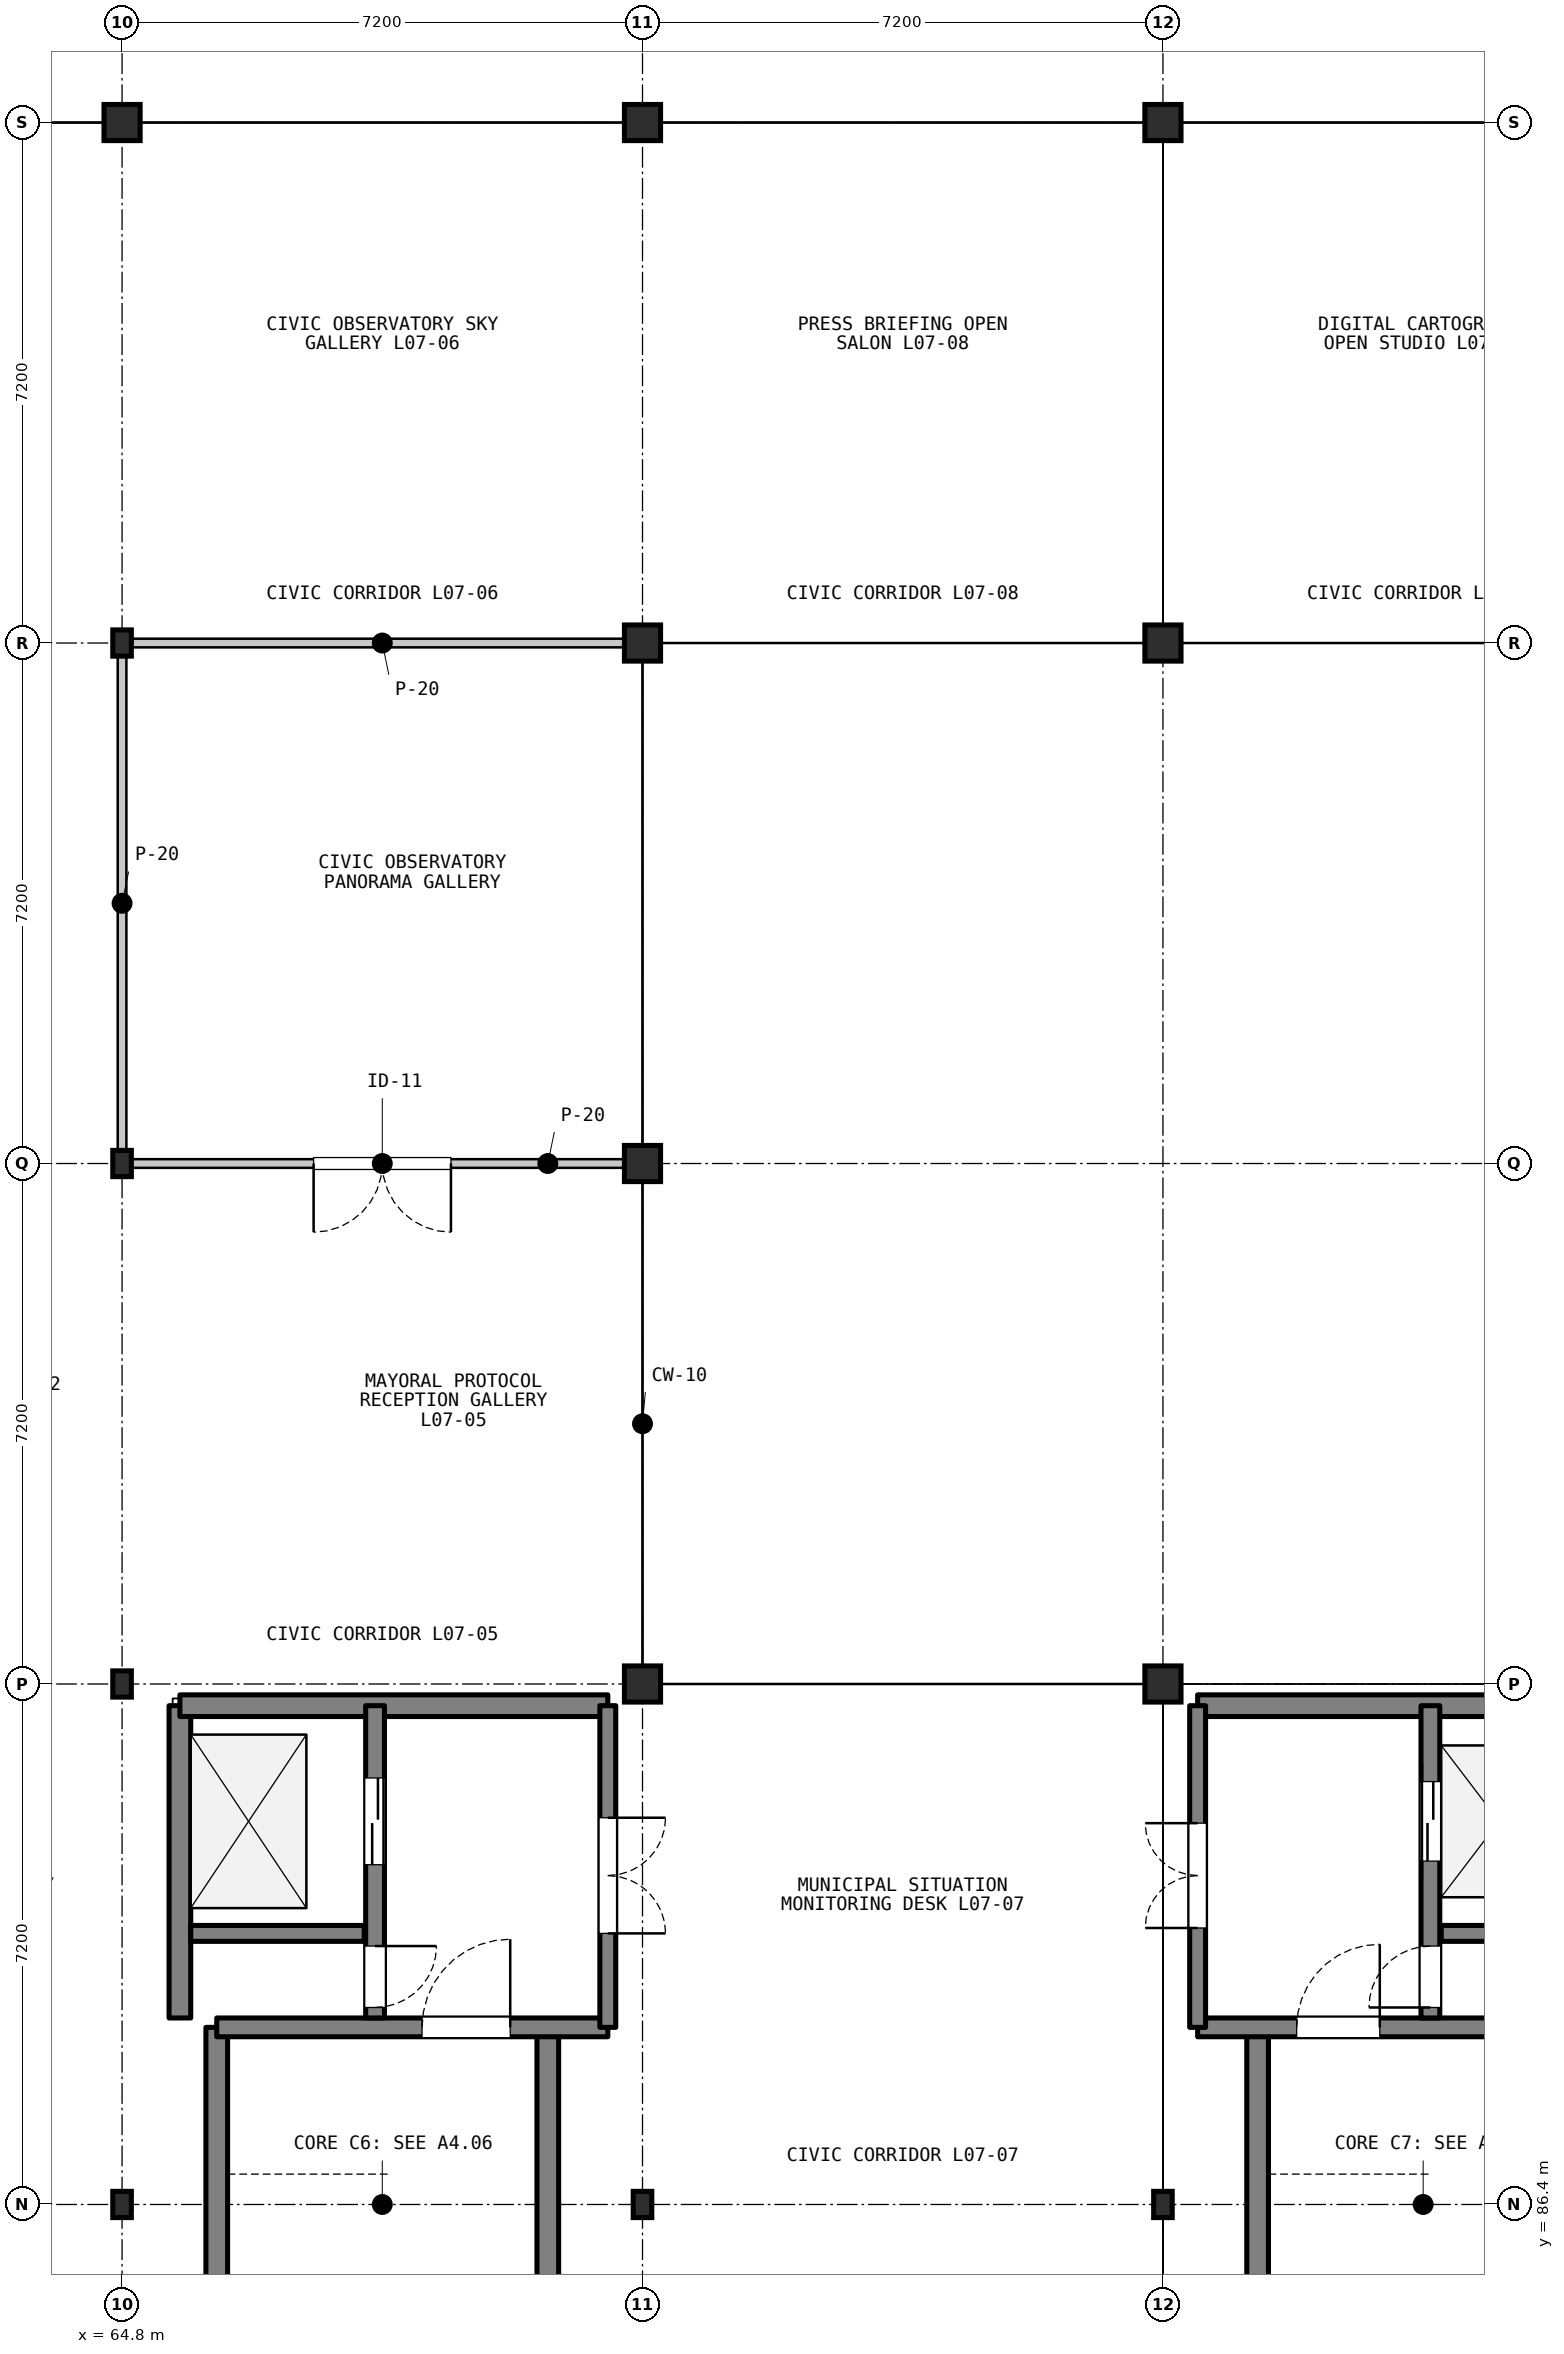
"""IFC4 building model, lengths in metres.
Left out: names, types, materials, properties, quantities, classifications, styles, units other than length and angle.
Written with IfcOpenShell. Run it as: python <this file> out.ifc"""

import sys

from ifc_helpers import new_model, si_unit, direction, frame, frame_2d, origin, origin_2d, place, context, subcontext, project, spatial, rectangle, i_section, extrude, element, fill, save


model = new_model("IFC4")
c1 = context("Model", 3, precision=1e-05, world=origin(), true_north=direction((0.0, 1.0)))
c2 = subcontext(c1, "Body", "Model", "MODEL_VIEW")
j1 = project(units=[si_unit("LENGTHUNIT", "METRE"), si_unit("PLANEANGLEUNIT", "RADIAN")], contexts=[c1])
p1 = place(None, origin())
s1 = spatial("IfcSite", under=j1, at=p1, CompositionType="ELEMENT")
p2 = place(p1, origin())
s2 = spatial("IfcBuilding", under=s1, at=p2, CompositionType="ELEMENT")
p3 = place(p2, frame((0.0, 0.0, 25.8)))
s3 = spatial("IfcBuildingStorey", under=s2, at=p3, CompositionType="ELEMENT", Elevation=25.8)
p4 = place(p3, frame((64.8, 86.4, 0.0), z_axis=(0.0, 0.0, 1.0), x_axis=(1.0, 0.0, 0.0)))
e1 = element("IfcColumn", 1, at=p4, inside=s3, PredefinedType="COLUMN", context=c2, shape_type="SweptSolid", body=[
    extrude(i_section(OverallWidth=0.257, OverallDepth=0.363, WebThickness=0.013, FlangeThickness=0.022, FilletRadius=0.015, at=origin_2d()), origin(), (0.0, 0.0, 1.0), 3.733),
])
for number, where, z_axis, x_axis in (
    (2, (64.8, 93.6, 0.0), (0.0, 0.0, 1.0), (1.0, 0.0, 0.0)),
    (3, (64.8, 100.8, 0.0), (0.0, 0.0, 1.0), (1.0, 0.0, 0.0)),
    (4, (64.8, 108.0, 0.0), (0.0, 0.0, 1.0), (1.0, 0.0, 0.0)),
):
    element("IfcColumn", number, at=place(p3, frame(where, z_axis=z_axis, x_axis=x_axis)), inside=s3, PredefinedType="COLUMN", context=c2, shape_type="SweptSolid", body=[
        extrude(i_section(OverallWidth=0.257, OverallDepth=0.363, WebThickness=0.013, FlangeThickness=0.022, FilletRadius=0.015, at=origin_2d()), origin(), (0.0, 0.0, 1.0), 4.2),
    ])
p5 = place(p3, frame((64.8, 115.2, 0.0), z_axis=(0.0, 0.0, 1.0), x_axis=(1.0, 0.0, 0.0)))
e5 = element("IfcColumn", 5, at=p5, inside=s3, PredefinedType="COLUMN", context=c2, shape_type="SweptSolid", body=[
    extrude(rectangle(XDim=0.5, YDim=0.5, at=origin_2d()), origin(), (0.0, 0.0, 1.0), 4.2),
])
p6 = place(p3, frame((72.0, 86.4, 0.0), z_axis=(0.0, 0.0, 1.0), x_axis=(1.0, 0.0, 0.0)))
e6 = element("IfcColumn", 6, at=p6, inside=s3, PredefinedType="COLUMN", context=c2, shape_type="SweptSolid", body=[
    extrude(i_section(OverallWidth=0.257, OverallDepth=0.363, WebThickness=0.013, FlangeThickness=0.022, FilletRadius=0.015, at=origin_2d()), origin(), (0.0, 0.0, 1.0), 3.733),
])
for number, where, z_axis, x_axis in (
    (7, (72.0, 93.6, 0.0), (0.0, 0.0, 1.0), (1.0, 0.0, 0.0)),
    (8, (72.0, 100.8, 0.0), (0.0, 0.0, 1.0), (1.0, 0.0, 0.0)),
    (9, (72.0, 108.0, 0.0), (0.0, 0.0, 1.0), (1.0, 0.0, 0.0)),
    (10, (72.0, 115.2, 0.0), (0.0, 0.0, 1.0), (1.0, 0.0, 0.0)),
):
    element("IfcColumn", number, at=place(p3, frame(where, z_axis=z_axis, x_axis=x_axis)), inside=s3, PredefinedType="COLUMN", context=c2, shape_type="SweptSolid", body=[
        extrude(rectangle(XDim=0.5, YDim=0.5, at=origin_2d()), origin(), (0.0, 0.0, 1.0), 4.2),
    ])
p7 = place(p3, frame((79.2, 86.4, 0.0), z_axis=(0.0, 0.0, 1.0), x_axis=(1.0, 0.0, 0.0)))
e11 = element("IfcColumn", 11, at=p7, inside=s3, PredefinedType="COLUMN", context=c2, shape_type="SweptSolid", body=[
    extrude(i_section(OverallWidth=0.257, OverallDepth=0.363, WebThickness=0.013, FlangeThickness=0.022, FilletRadius=0.015, at=origin_2d()), origin(), (0.0, 0.0, 1.0), 3.733),
])
for number, where, z_axis, x_axis in (
    (12, (79.2, 93.6, 0.0), (0.0, 0.0, 1.0), (1.0, 0.0, 0.0)),
    (13, (79.2, 108.0, 0.0), (0.0, 0.0, 1.0), (1.0, 0.0, 0.0)),
    (14, (79.2, 115.2, 0.0), (0.0, 0.0, 1.0), (1.0, 0.0, 0.0)),
):
    element("IfcColumn", number, at=place(p3, frame(where, z_axis=z_axis, x_axis=x_axis)), inside=s3, PredefinedType="COLUMN", context=c2, shape_type="SweptSolid", body=[
        extrude(rectangle(XDim=0.5, YDim=0.5, at=origin_2d()), origin(), (0.0, 0.0, 1.0), 4.2),
    ])
for number, where, z_axis, x_axis in (
    (15, (66.11, 79.55, 0.0), (0.0, 0.0, 1.0), (0.0, 1.0, 0.0)),
    (16, (70.69, 79.55, 0.0), (0.0, 0.0, 1.0), (0.0, 1.0, 0.0)),
):
    element("IfcWall", number, at=place(p3, frame(where, z_axis=z_axis, x_axis=x_axis)), inside=s3, PredefinedType="SHEAR", context=c2, shape_type="SweptSolid", body=[
        extrude(rectangle(XDim=9.3, YDim=0.3, at=frame_2d((4.65, 0.0))), origin(), (0.0, 0.0, 1.0), 5.26),
    ])
p8 = place(p3, frame((66.11, 88.85, 0.0), z_axis=(0.0, 0.0, 1.0), x_axis=(1.0, 0.0, 0.0)))
e17 = element("IfcWall", 17, at=p8, inside=s3, PredefinedType="SHEAR", context=c2, shape_type="SweptSolid", body=[
    extrude(rectangle(XDim=5.41, YDim=0.26, at=frame_2d((2.705, 0.0))), origin(), (0.0, 0.0, 1.0), 5.26),
])
p9 = place(p8, frame((2.84, 0.0, 0.0)))
e18 = element("IfcOpeningElement", 18, at=p9, cuts=e17, PredefinedType="OPENING", context=c2, shape_type="SweptSolid", body=[
    extrude(rectangle(XDim=1.22, YDim=2.15, at=frame_2d((0.61, 1.075))), frame((0.0, 0.14, 0.0), z_axis=(0.0, -1.0, 0.0), x_axis=(1.0, 0.0, 0.0)), (0.0, 0.0, 1.0), 0.28),
])
p10 = place(p3, frame((65.6, 88.98, 0.0), z_axis=(0.0, 0.0, 1.0), x_axis=(0.0, 1.0, 0.0)))
e19 = element("IfcWall", 19, at=p10, inside=s3, PredefinedType="SHEAR", context=c2, shape_type="SweptSolid", body=[
    extrude(rectangle(XDim=4.32, YDim=0.3, at=frame_2d((2.16, 0.0))), origin(), (0.0, 0.0, 1.0), 5.26),
])
p11 = place(p3, frame((65.6, 93.3, 0.0), z_axis=(0.0, 0.0, 1.0), x_axis=(1.0, 0.0, 0.0)))
e20 = element("IfcWall", 20, at=p11, inside=s3, PredefinedType="SHEAR", context=c2, shape_type="SweptSolid", body=[
    extrude(rectangle(XDim=5.92, YDim=0.3, at=frame_2d((2.96, 0.0))), origin(), (0.0, 0.0, 1.0), 5.26),
])
p12 = place(p3, frame((65.75, 90.15, 0.0), z_axis=(0.0, 0.0, 1.0), x_axis=(1.0, 0.0, 0.0)))
e21 = element("IfcWall", 21, at=p12, inside=s3, PredefinedType="SHEAR", context=c2, shape_type="SweptSolid", body=[
    extrude(rectangle(XDim=2.4, YDim=0.22, at=frame_2d((1.2, 0.0))), origin(), (0.0, 0.0, 1.0), 5.26),
])
p13 = place(p3, frame((68.3, 93.3, 0.0), z_axis=(0.0, 0.0, 1.0), x_axis=(0.0, -1.0, 0.0)))
e22 = element("IfcWall", 22, at=p13, inside=s3, PredefinedType="SHEAR", context=c2, shape_type="SweptSolid", body=[
    extrude(rectangle(XDim=4.32, YDim=0.26, at=frame_2d((2.16, 0.0))), origin(), (0.0, 0.0, 1.0), 5.26),
])
p14 = place(p13, frame((1.0, 0.0, 0.0)))
e23 = element("IfcOpeningElement", 23, at=p14, cuts=e22, PredefinedType="OPENING", context=c2, shape_type="SweptSolid", body=[
    extrude(rectangle(XDim=1.2, YDim=2.15, at=frame_2d((0.6, 1.075))), frame((0.0, 0.14, 0.0), z_axis=(0.0, -1.0, 0.0), x_axis=(1.0, 0.0, 0.0)), (0.0, 0.0, 1.0), 0.28),
])
p15 = place(p13, frame((3.325, 0.0, 0.0)))
e24 = element("IfcOpeningElement", 24, at=p15, cuts=e22, PredefinedType="OPENING", context=c2, shape_type="SweptSolid", body=[
    extrude(rectangle(XDim=0.85, YDim=2.05, at=frame_2d((0.425, 1.025))), frame((0.0, 0.14, 0.0), z_axis=(0.0, -1.0, 0.0), x_axis=(1.0, 0.0, 0.0)), (0.0, 0.0, 1.0), 0.28),
])
p16 = place(p3, frame((71.52, 93.3, 0.0), z_axis=(0.0, 0.0, 1.0), x_axis=(0.0, -1.0, 0.0)))
e25 = element("IfcWall", 25, at=p16, inside=s3, PredefinedType="SHEAR", context=c2, shape_type="SweptSolid", body=[
    extrude(rectangle(XDim=4.45, YDim=0.22, at=frame_2d((2.225, 0.0))), origin(), (0.0, 0.0, 1.0), 5.26),
])
p17 = place(p16, frame((1.55, 0.0, 0.0)))
e26 = element("IfcOpeningElement", 26, at=p17, cuts=e25, PredefinedType="OPENING", context=c2, shape_type="SweptSolid", body=[
    extrude(rectangle(XDim=1.6, YDim=2.2, at=frame_2d((0.8, 1.1))), frame((0.0, 0.12, 0.0), z_axis=(0.0, -1.0, 0.0), x_axis=(1.0, 0.0, 0.0)), (0.0, 0.0, 1.0), 0.24),
])
p18 = place(p3, frame((80.51, 79.55, 0.0), z_axis=(0.0, 0.0, 1.0), x_axis=(0.0, 1.0, 0.0)))
e27 = element("IfcWall", 27, at=p18, inside=s3, PredefinedType="SHEAR", context=c2, shape_type="SweptSolid", body=[
    extrude(rectangle(XDim=9.3, YDim=0.3, at=frame_2d((4.65, 0.0))), origin(), (0.0, 0.0, 1.0), 5.26),
])
p19 = place(p3, frame((79.68, 88.85, 0.0), z_axis=(0.0, 0.0, 1.0), x_axis=(1.0, 0.0, 0.0)))
e28 = element("IfcWall", 28, at=p19, inside=s3, PredefinedType="SHEAR", context=c2, shape_type="SweptSolid", body=[
    extrude(rectangle(XDim=5.41, YDim=0.26, at=frame_2d((2.705, 0.0))), origin(), (0.0, 0.0, 1.0), 5.26),
])
p20 = place(p19, frame((1.37, 0.0, 0.0)))
e29 = element("IfcOpeningElement", 29, at=p20, cuts=e28, PredefinedType="OPENING", context=c2, shape_type="SweptSolid", body=[
    extrude(rectangle(XDim=1.15, YDim=2.15, at=frame_2d((0.575, 1.075))), frame((0.0, 0.14, 0.0), z_axis=(0.0, -1.0, 0.0), x_axis=(1.0, 0.0, 0.0)), (0.0, 0.0, 1.0), 0.28),
])
p21 = place(p3, frame((79.68, 93.3, 0.0), z_axis=(0.0, 0.0, 1.0), x_axis=(1.0, 0.0, 0.0)))
e30 = element("IfcWall", 30, at=p21, inside=s3, PredefinedType="SHEAR", context=c2, shape_type="SweptSolid", body=[
    extrude(rectangle(XDim=5.92, YDim=0.3, at=frame_2d((2.96, 0.0))), origin(), (0.0, 0.0, 1.0), 5.26),
])
p22 = place(p3, frame((83.05, 90.15, 0.0), z_axis=(0.0, 0.0, 1.0), x_axis=(1.0, 0.0, 0.0)))
e31 = element("IfcWall", 31, at=p22, inside=s3, PredefinedType="SHEAR", context=c2, shape_type="SweptSolid", body=[
    extrude(rectangle(XDim=2.4, YDim=0.22, at=frame_2d((1.2, 0.0))), origin(), (0.0, 0.0, 1.0), 5.26),
])
p23 = place(p3, frame((82.9, 88.98, 0.0), z_axis=(0.0, 0.0, 1.0), x_axis=(0.0, 1.0, 0.0)))
e32 = element("IfcWall", 32, at=p23, inside=s3, PredefinedType="SHEAR", context=c2, shape_type="SweptSolid", body=[
    extrude(rectangle(XDim=4.32, YDim=0.26, at=frame_2d((2.16, 0.0))), origin(), (0.0, 0.0, 1.0), 5.26),
])
p24 = place(p23, frame((2.17, 0.0, 0.0)))
e33 = element("IfcOpeningElement", 33, at=p24, cuts=e32, PredefinedType="OPENING", context=c2, shape_type="SweptSolid", body=[
    extrude(rectangle(XDim=1.1, YDim=2.15, at=frame_2d((0.55, 1.075))), frame((0.0, 0.14, 0.0), z_axis=(0.0, -1.0, 0.0), x_axis=(1.0, 0.0, 0.0)), (0.0, 0.0, 1.0), 0.28),
])
p25 = place(p23, frame((0.145, 0.0, 0.0)))
e34 = element("IfcOpeningElement", 34, at=p25, cuts=e32, PredefinedType="OPENING", context=c2, shape_type="SweptSolid", body=[
    extrude(rectangle(XDim=0.85, YDim=2.05, at=frame_2d((0.425, 1.025))), frame((0.0, 0.14, 0.0), z_axis=(0.0, -1.0, 0.0), x_axis=(1.0, 0.0, 0.0)), (0.0, 0.0, 1.0), 0.28),
])
p26 = place(p3, frame((79.68, 88.85, 0.0), z_axis=(0.0, 0.0, 1.0), x_axis=(0.0, 1.0, 0.0)))
e35 = element("IfcWall", 35, at=p26, inside=s3, PredefinedType="SHEAR", context=c2, shape_type="SweptSolid", body=[
    extrude(rectangle(XDim=4.45, YDim=0.22, at=frame_2d((2.225, 0.0))), origin(), (0.0, 0.0, 1.0), 5.26),
])
p27 = place(p26, frame((1.375, 0.0, 0.0)))
e36 = element("IfcOpeningElement", 36, at=p27, cuts=e35, PredefinedType="OPENING", context=c2, shape_type="SweptSolid", body=[
    extrude(rectangle(XDim=1.45, YDim=2.2, at=frame_2d((0.725, 1.1))), frame((0.0, 0.12, 0.0), z_axis=(0.0, -1.0, 0.0), x_axis=(1.0, 0.0, 0.0)), (0.0, 0.0, 1.0), 0.24),
])
p28 = place(p3, frame((71.88, 100.8, 0.0), z_axis=(0.0, 0.0, 1.0), x_axis=(-1.0, 0.0, 0.0)))
e37 = element("IfcWall", 37, at=p28, inside=s3, PredefinedType="PARTITIONING", context=c2, shape_type="SweptSolid", body=[
    extrude(rectangle(XDim=6.96, YDim=0.12, at=frame_2d((3.48, 0.0))), origin(), (0.0, 0.0, 1.0), 4.0),
])
p29 = place(p28, frame((2.53, 0.0, 0.0)))
e38 = element("IfcOpeningElement", 38, at=p29, cuts=e37, PredefinedType="OPENING", context=c2, shape_type="SweptSolid", body=[
    extrude(rectangle(XDim=1.9, YDim=2.45, at=frame_2d((0.95, 1.225))), frame((0.0, 0.07, 0.0), z_axis=(0.0, -1.0, 0.0), x_axis=(1.0, 0.0, 0.0)), (0.0, 0.0, 1.0), 0.14),
])
p30 = place(p3, frame((64.92, 108.0, 0.0), z_axis=(0.0, 0.0, 1.0), x_axis=(1.0, 0.0, 0.0)))
e39 = element("IfcWall", 39, at=p30, inside=s3, PredefinedType="PARTITIONING", context=c2, shape_type="SweptSolid", body=[
    extrude(rectangle(XDim=6.96, YDim=0.12, at=frame_2d((3.48, 0.0))), origin(), (0.0, 0.0, 1.0), 3.48),
])
p31 = place(p3, frame((64.8, 100.92, 0.0), z_axis=(0.0, 0.0, 1.0), x_axis=(0.0, 1.0, 0.0)))
e40 = element("IfcWall", 40, at=p31, inside=s3, PredefinedType="PARTITIONING", context=c2, shape_type="SweptSolid", body=[
    extrude(rectangle(XDim=6.96, YDim=0.12, at=frame_2d((3.48, 0.0))), origin(), (0.0, 0.0, 1.0), 3.501),
])
p32 = place(p9, origin())
e41 = element("IfcDoor", 41, at=p32, inside=s3, OperationType="SINGLE_SWING_RIGHT", PredefinedType="DOOR", context=c2, shape_type="SweptSolid", body=[
    extrude(rectangle(XDim=1.22, YDim=2.15, at=frame_2d((0.61, 1.075))), frame((0.0, 0.025, 0.0), z_axis=(0.0, -1.0, 0.0), x_axis=(1.0, 0.0, 0.0)), (0.0, 0.0, 1.0), 0.05),
])
fill(e18, e41)
p33 = place(p14, origin())
e42 = element("IfcDoor", 42, at=p33, inside=s3, OperationType="DOUBLE_DOOR_SLIDING", PredefinedType="DOOR", context=c2, shape_type="SweptSolid", body=[
    extrude(rectangle(XDim=1.2, YDim=2.15, at=frame_2d((0.6, 1.075))), frame((0.0, 0.025, 0.0), z_axis=(0.0, -1.0, 0.0), x_axis=(1.0, 0.0, 0.0)), (0.0, 0.0, 1.0), 0.05),
])
fill(e23, e42)
p34 = place(p15, origin())
e43 = element("IfcDoor", 43, at=p34, inside=s3, OperationType="SINGLE_SWING_LEFT", PredefinedType="DOOR", context=c2, shape_type="SweptSolid", body=[
    extrude(rectangle(XDim=0.85, YDim=2.05, at=frame_2d((0.425, 1.025))), frame((0.0, 0.025, 0.0), z_axis=(0.0, -1.0, 0.0), x_axis=(1.0, 0.0, 0.0)), (0.0, 0.0, 1.0), 0.05),
])
fill(e24, e43)
p35 = place(p17, origin())
e44 = element("IfcDoor", 44, at=p35, inside=s3, OperationType="DOUBLE_DOOR_SINGLE_SWING", PredefinedType="DOOR", context=c2, shape_type="SweptSolid", body=[
    extrude(rectangle(XDim=1.6, YDim=2.2, at=frame_2d((0.8, 1.1))), frame((0.0, 0.025, 0.0), z_axis=(0.0, -1.0, 0.0), x_axis=(1.0, 0.0, 0.0)), (0.0, 0.0, 1.0), 0.05),
])
fill(e26, e44)
p36 = place(p20, origin())
e45 = element("IfcDoor", 45, at=p36, inside=s3, OperationType="SINGLE_SWING_RIGHT", PredefinedType="DOOR", context=c2, shape_type="SweptSolid", body=[
    extrude(rectangle(XDim=1.15, YDim=2.15, at=frame_2d((0.575, 1.075))), frame((0.0, 0.025, 0.0), z_axis=(0.0, -1.0, 0.0), x_axis=(1.0, 0.0, 0.0)), (0.0, 0.0, 1.0), 0.05),
])
fill(e29, e45)
p37 = place(p24, origin())
e46 = element("IfcDoor", 46, at=p37, inside=s3, OperationType="DOUBLE_DOOR_SLIDING", PredefinedType="DOOR", context=c2, shape_type="SweptSolid", body=[
    extrude(rectangle(XDim=1.1, YDim=2.15, at=frame_2d((0.55, 1.075))), frame((0.0, 0.025, 0.0), z_axis=(0.0, -1.0, 0.0), x_axis=(1.0, 0.0, 0.0)), (0.0, 0.0, 1.0), 0.05),
])
fill(e33, e46)
p38 = place(p25, origin())
e47 = element("IfcDoor", 47, at=p38, inside=s3, OperationType="SINGLE_SWING_LEFT", PredefinedType="DOOR", context=c2, shape_type="SweptSolid", body=[
    extrude(rectangle(XDim=0.85, YDim=2.05, at=frame_2d((0.425, 1.025))), frame((0.0, 0.025, 0.0), z_axis=(0.0, -1.0, 0.0), x_axis=(1.0, 0.0, 0.0)), (0.0, 0.0, 1.0), 0.05),
])
fill(e34, e47)
p39 = place(p27, origin())
e48 = element("IfcDoor", 48, at=p39, inside=s3, OperationType="DOUBLE_DOOR_SINGLE_SWING", PredefinedType="DOOR", context=c2, shape_type="SweptSolid", body=[
    extrude(rectangle(XDim=1.45, YDim=2.2, at=frame_2d((0.725, 1.1))), frame((0.0, 0.025, 0.0), z_axis=(0.0, -1.0, 0.0), x_axis=(1.0, 0.0, 0.0)), (0.0, 0.0, 1.0), 0.05),
])
fill(e36, e48)
p40 = place(p29, origin())
e49 = element("IfcDoor", 49, at=p40, inside=s3, OperationType="DOUBLE_DOOR_SINGLE_SWING", PredefinedType="DOOR", context=c2, shape_type="SweptSolid", body=[
    extrude(rectangle(XDim=1.9, YDim=2.45, at=frame_2d((0.95, 1.225))), frame((0.0, 0.025, 0.0), z_axis=(0.0, -1.0, 0.0), x_axis=(1.0, 0.0, 0.0)), (0.0, 0.0, 1.0), 0.05),
])
fill(e38, e49)
save(model, sys.argv[1])
